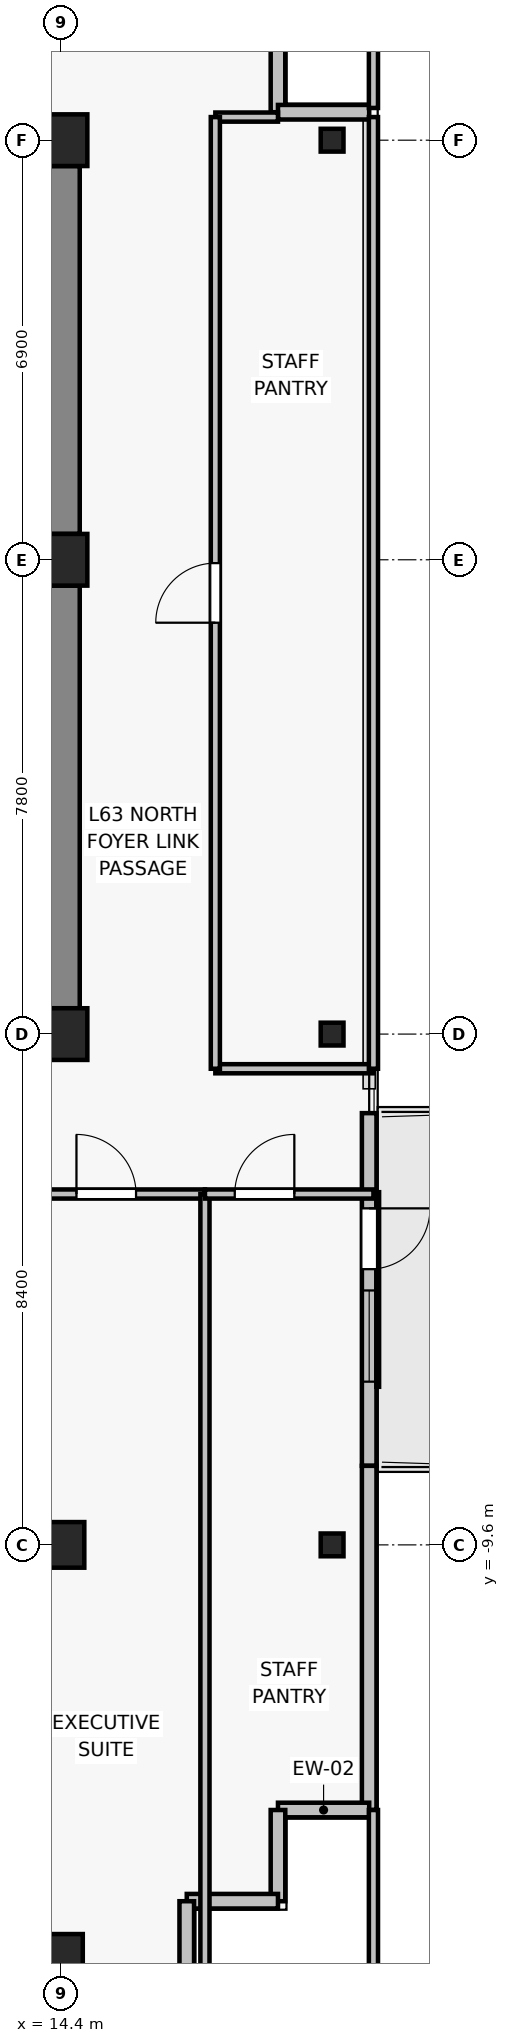
"""IFC4 building model, lengths in metres.
Left out: names, types, materials, properties, quantities, classifications, styles, units other than length and angle.
Written with IfcOpenShell. Run it as: python <this file> out.ifc"""

import sys

from ifc_helpers import new_model, si_unit, direction, frame, frame_2d, origin, origin_2d, place, context, subcontext, project, spatial, rectangle, i_section, extrude, source, transform, mapped, element, fill, save


model = new_model("IFC4")
c1 = context("Model", 3, precision=1e-05, world=origin(), true_north=direction((0.0, 1.0)))
c2 = subcontext(c1, "Body", "Model", "MODEL_VIEW")
j1 = project(units=[si_unit("LENGTHUNIT", "METRE"), si_unit("PLANEANGLEUNIT", "RADIAN")], contexts=[c1])
p1 = place(None, origin())
s1 = spatial("IfcSite", under=j1, at=p1, CompositionType="ELEMENT")
p2 = place(p1, origin())
s2 = spatial("IfcBuilding", under=s1, at=p2, CompositionType="ELEMENT")
p3 = place(p2, frame((0.0, 0.0, 225.4)))
s3 = spatial("IfcBuildingStorey", under=s2, at=p3, CompositionType="ELEMENT", Elevation=225.4)
for number, where, z_axis, x_axis in (
    (1, (14.4, -1.2, 0.0), (0.0, 0.0, 1.0), (1.0, 0.0, 0.0)),
    (2, (14.4, 6.6, 0.0), (0.0, 0.0, 1.0), (1.0, 0.0, 0.0)),
    (3, (14.4, 13.5, 0.0), (0.0, 0.0, 1.0), (1.0, 0.0, 0.0)),
):
    element("IfcColumn", number, at=place(p3, frame(where, z_axis=z_axis, x_axis=x_axis)), inside=s3, PredefinedType="COLUMN", context=c2, shape_type="SweptSolid", body=[
        extrude(rectangle(XDim=0.85, YDim=0.85, at=origin_2d()), origin(), (0.0, 0.0, 1.0), 3.3),
    ])
p4 = place(p3, frame((14.4, -9.6, 0.0), z_axis=(0.0, 0.0, 1.0), x_axis=(1.0, 0.0, 0.0)))
e4 = element("IfcColumn", 4, at=p4, inside=s3, PredefinedType="COLUMN", context=c2, shape_type="SweptSolid", body=[
    extrude(rectangle(XDim=0.75, YDim=0.75, at=origin_2d()), origin(), (0.0, 0.0, 1.0), 3.3),
])
p5 = place(p3, frame((14.4, -16.35, 0.0), z_axis=(0.0, 0.0, 1.0), x_axis=(1.0, 0.0, 0.0)))
e5 = element("IfcColumn", 5, at=p5, inside=s3, PredefinedType="COLUMN", context=c2, shape_type="SweptSolid", body=[
    extrude(rectangle(XDim=0.7, YDim=0.7, at=origin_2d()), origin(), (0.0, 0.0, 1.0), 3.3),
])
for number, where, z_axis, x_axis in (
    (6, (18.85, -9.6, 0.0), (0.0, 0.0, 1.0), (1.0, 0.0, 0.0)),
    (7, (18.85, -1.2, 0.0), (0.0, 0.0, 1.0), (1.0, 0.0, 0.0)),
    (8, (18.85, 13.5, 0.0), (0.0, 0.0, 1.0), (1.0, 0.0, 0.0)),
):
    element("IfcColumn", number, at=place(p3, frame(where, z_axis=z_axis, x_axis=x_axis)), inside=s3, PredefinedType="COLUMN", context=c2, shape_type="SweptSolid", body=[
        extrude(i_section(OverallWidth=0.375, OverallDepth=0.375, WebThickness=0.017, FlangeThickness=0.027, FilletRadius=0.015, at=origin_2d()), origin(), (0.0, 0.0, 1.0), 3.3),
    ])
p6 = place(p3, frame((14.4, -0.775, 0.0), z_axis=(0.0, 0.0, 1.0), x_axis=(0.0, 1.0, 0.0)))
e9 = element("IfcWall", 9, at=p6, inside=s3, PredefinedType="SHEAR", context=c2, shape_type="SweptSolid", body=[
    extrude(rectangle(XDim=6.95, YDim=0.6, at=frame_2d((3.475, 0.0))), origin(), (0.0, 0.0, 1.0), 3.075),
])
p7 = place(p3, frame((14.4, 7.025, 0.0), z_axis=(0.0, 0.0, 1.0), x_axis=(0.0, 1.0, 0.0)))
e10 = element("IfcWall", 10, at=p7, inside=s3, PredefinedType="SHEAR", context=c2, shape_type="SweptSolid", body=[
    extrude(rectangle(XDim=6.05, YDim=0.6, at=frame_2d((3.025, 0.0))), origin(), (0.0, 0.0, 1.0), 3.075),
])
p8 = place(p3, frame((19.46, -2.5, 0.0), z_axis=(0.0, 0.0, 1.0), x_axis=(0.0, -1.0, 0.0)))
e11 = element("IfcWall", 11, at=p8, inside=s3, PredefinedType="SOLIDWALL", context=c2, shape_type="SweptSolid", body=[
    extrude(rectangle(XDim=5.8, YDim=0.24, at=frame_2d((2.9, 0.0))), origin(), (0.0, 0.0, 1.0), 3.075),
])
p9 = place(p8, frame((1.566, 0.0, 0.0)))
e12 = element("IfcOpeningElement", 12, at=p9, cuts=e11, PredefinedType="OPENING", context=c2, shape_type="SweptSolid", body=[
    extrude(rectangle(XDim=1.0, YDim=2.2, at=frame_2d((0.5, 1.1))), frame((0.0, 0.13, 0.0), z_axis=(0.0, -1.0, 0.0), x_axis=(1.0, 0.0, 0.0)), (0.0, 0.0, 1.0), 0.26),
])
p10 = place(p8, frame((2.916, 0.0, 0.85)))
e13 = element("IfcOpeningElement", 13, at=p10, cuts=e11, PredefinedType="OPENING", context=c2, shape_type="SweptSolid", body=[
    extrude(rectangle(XDim=1.5, YDim=1.6, at=frame_2d((0.75, 0.8))), frame((0.0, 0.13, 0.0), z_axis=(0.0, -1.0, 0.0), x_axis=(1.0, 0.0, 0.0)), (0.0, 0.0, 1.0), 0.26),
])
for number, where, z_axis, x_axis in (
    (14, (17.96, 13.96, 0.0), (0.0, 0.0, 1.0), (0.0, 1.0, 0.0)),
    (15, (19.46, 13.96, 0.0), (0.0, 0.0, 1.0), (-1.0, 0.0, 0.0)),
):
    element("IfcWall", number, at=place(p3, frame(where, z_axis=z_axis, x_axis=x_axis)), inside=s3, PredefinedType="SOLIDWALL", context=c2, shape_type="SweptSolid", body=[
        extrude(rectangle(XDim=1.5, YDim=0.24, at=frame_2d((0.75, 0.0))), origin(), (0.0, 0.0, 1.0), 3.075),
    ])
p11 = place(p3, frame((19.46, -13.96, 0.0), z_axis=(0.0, 0.0, 1.0), x_axis=(0.0, 1.0, 0.0)))
e16 = element("IfcWall", 16, at=p11, inside=s3, PredefinedType="SOLIDWALL", context=c2, shape_type="SweptSolid", body=[
    extrude(rectangle(XDim=5.66, YDim=0.24, at=frame_2d((2.83, 0.0))), origin(), (0.0, 0.0, 1.0), 3.075),
])
for number, where, z_axis, x_axis in (
    (17, (17.96, -13.96, 0.0), (0.0, 0.0, 1.0), (1.0, 0.0, 0.0)),
    (18, (17.96, -15.46, 0.0), (0.0, 0.0, 1.0), (0.0, 1.0, 0.0)),
    (19, (16.46, -15.46, 0.0), (0.0, 0.0, 1.0), (1.0, 0.0, 0.0)),
    (20, (16.46, -16.96, 0.0), (0.0, 0.0, 1.0), (0.0, 1.0, 0.0)),
):
    element("IfcWall", number, at=place(p3, frame(where, z_axis=z_axis, x_axis=x_axis)), inside=s3, PredefinedType="SOLIDWALL", context=c2, shape_type="SweptSolid", body=[
        extrude(rectangle(XDim=1.5, YDim=0.24, at=frame_2d((0.75, 0.0))), origin(), (0.0, 0.0, 1.0), 3.075),
    ])
p12 = place(p3, frame((13.513, -3.83, 0.0), z_axis=(0.0, 0.0, 1.0), x_axis=(1.0, 0.0, 0.0)))
e21 = element("IfcWall", 21, at=p12, inside=s3, PredefinedType="PARTITIONING", context=c2, shape_type="SweptSolid", body=[
    extrude(rectangle(XDim=3.246, YDim=0.15, at=frame_2d((1.623, 0.0))), origin(), (0.0, 0.0, 1.0), 2.615),
])
p13 = place(p12, frame((1.133, 0.0, 0.0)))
e22 = element("IfcOpeningElement", 22, at=p13, cuts=e21, PredefinedType="OPENING", context=c2, shape_type="SweptSolid", body=[
    extrude(rectangle(XDim=0.98, YDim=2.15, at=frame_2d((0.49, 1.075))), frame((0.0, 0.085, 0.0), z_axis=(0.0, -1.0, 0.0), x_axis=(1.0, 0.0, 0.0)), (0.0, 0.0, 1.0), 0.17),
])
p14 = place(p3, frame((16.759, -3.83, 0.0), z_axis=(0.0, 0.0, 1.0), x_axis=(0.0, -1.0, 0.0)))
e23 = element("IfcWall", 23, at=p14, inside=s3, PredefinedType="PARTITIONING", context=c2, shape_type="SweptSolid", body=[
    extrude(rectangle(XDim=13.2, YDim=0.15, at=frame_2d((6.6, 0.0))), origin(), (0.0, 0.0, 1.0), 2.615),
])
p15 = place(p3, frame((16.759, -3.83, 0.0), z_axis=(0.0, 0.0, 1.0), x_axis=(1.0, 0.0, 0.0)))
e24 = element("IfcWall", 24, at=p15, inside=s3, PredefinedType="PARTITIONING", context=c2, shape_type="SweptSolid", body=[
    extrude(rectangle(XDim=2.771, YDim=0.15, at=frame_2d((1.385, 0.0))), origin(), (0.0, 0.0, 1.0), 2.765),
])
p16 = place(p15, frame((0.49, 0.0, 0.0)))
e25 = element("IfcOpeningElement", 25, at=p16, cuts=e24, PredefinedType="OPENING", context=c2, shape_type="SweptSolid", body=[
    extrude(rectangle(XDim=0.98, YDim=2.15, at=frame_2d((0.49, 1.075))), frame((0.0, 0.085, 0.0), z_axis=(0.0, -1.0, 0.0), x_axis=(1.0, 0.0, 0.0)), (0.0, 0.0, 1.0), 0.17),
])
p17 = place(p3, frame((19.53, -13.96, 0.0), z_axis=(0.0, 0.0, 1.0), x_axis=(0.0, -1.0, 0.0)))
e26 = element("IfcWall", 26, at=p17, inside=s3, PredefinedType="PARTITIONING", context=c2, shape_type="SweptSolid", body=[
    extrude(rectangle(XDim=3.07, YDim=0.15, at=frame_2d((1.535, 0.0))), origin(), (0.0, 0.0, 1.0), 3.075),
])
p18 = place(p3, frame((19.53, -1.77, 0.0), z_axis=(0.0, 0.0, 1.0), x_axis=(-1.0, 0.0, 0.0)))
e27 = element("IfcWall", 27, at=p18, inside=s3, PredefinedType="PARTITIONING", context=c2, shape_type="SweptSolid", body=[
    extrude(rectangle(XDim=2.6, YDim=0.15, at=frame_2d((1.3, 0.0))), origin(), (0.0, 0.0, 1.0), 2.765),
])
p19 = place(p3, frame((16.93, 13.88, 0.0), z_axis=(0.0, 0.0, 1.0), x_axis=(1.0, 0.0, 0.0)))
e28 = element("IfcWall", 28, at=p19, inside=s3, PredefinedType="PARTITIONING", context=c2, shape_type="SweptSolid", body=[
    extrude(rectangle(XDim=1.03, YDim=0.15, at=frame_2d((0.515, 0.0))), origin(), (0.0, 0.0, 1.0), 3.075),
])
p20 = place(p3, frame((16.93, -1.77, 0.0), z_axis=(0.0, 0.0, 1.0), x_axis=(0.0, 1.0, 0.0)))
e29 = element("IfcWall", 29, at=p20, inside=s3, PredefinedType="PARTITIONING", context=c2, shape_type="SweptSolid", body=[
    extrude(rectangle(XDim=15.65, YDim=0.15, at=frame_2d((7.825, 0.0))), origin(), (0.0, 0.0, 1.0), 2.615),
])
p21 = place(p20, frame((7.335, 0.0, 0.0)))
e30 = element("IfcOpeningElement", 30, at=p21, cuts=e29, PredefinedType="OPENING", context=c2, shape_type="SweptSolid", body=[
    extrude(rectangle(XDim=0.98, YDim=2.15, at=frame_2d((0.49, 1.075))), frame((0.0, 0.085, 0.0), z_axis=(0.0, -1.0, 0.0), x_axis=(1.0, 0.0, 0.0)), (0.0, 0.0, 1.0), 0.17),
])
p22 = place(p3, frame((19.53, 13.88, 0.0), z_axis=(0.0, 0.0, 1.0), x_axis=(0.0, -1.0, 0.0)))
e31 = element("IfcWall", 31, at=p22, inside=s3, PredefinedType="PARTITIONING", context=c2, shape_type="SweptSolid", body=[
    extrude(rectangle(XDim=15.65, YDim=0.15, at=frame_2d((7.825, 0.0))), origin(), (0.0, 0.0, 1.0), 3.075),
])
p23 = place(p3, frame((19.53, 17.03, 0.0), z_axis=(0.0, 0.0, 1.0), x_axis=(0.0, -1.0, 0.0)))
e32 = element("IfcWall", 32, at=p23, inside=s3, PredefinedType="PARTITIONING", context=c2, shape_type="SweptSolid", body=[
    extrude(rectangle(XDim=3.0, YDim=0.15, at=frame_2d((1.5, 0.0))), origin(), (0.0, 0.0, 1.0), 3.075),
])
m1 = source(origin(), c2, "Body", "SweptSolid", [
    extrude(rectangle(XDim=1.0, YDim=2.2, at=frame_2d((0.5, 1.1))), frame((0.0, 0.025, 0.0), z_axis=(0.0, -1.0, 0.0), x_axis=(1.0, 0.0, 0.0)), (0.0, 0.0, 1.0), 0.05),
])
p24 = place(p9, origin())
e33 = element("IfcDoor", 33, at=p24, inside=s3, OperationType="SINGLE_SWING_LEFT", PredefinedType="DOOR", context=c2, shape_type="MappedRepresentation", body=[
    mapped(m1, transform((0.0, 0.0, 0.0), x_axis=(1.0, 0.0, 0.0), y_axis=(0.0, 1.0, 0.0), z_axis=(0.0, 0.0, 1.0), scale=1.0)),
])
fill(e12, e33)
m2 = source(origin(), c2, "Body", "SweptSolid", [
    extrude(rectangle(XDim=1.5, YDim=1.6, at=frame_2d((0.75, 0.8))), frame((0.0, 0.03, 0.0), z_axis=(0.0, -1.0, 0.0), x_axis=(1.0, 0.0, 0.0)), (0.0, 0.0, 1.0), 0.06),
])
p25 = place(p10, origin())
e34 = element("IfcWindow", 34, at=p25, inside=s3, PartitioningType="SINGLE_PANEL", PredefinedType="WINDOW", context=c2, shape_type="MappedRepresentation", body=[
    mapped(m2, transform((0.0, 0.0, 0.0), x_axis=(1.0, 0.0, 0.0), y_axis=(0.0, 1.0, 0.0), z_axis=(0.0, 0.0, 1.0), scale=1.0)),
])
fill(e13, e34)
m3 = source(origin(), c2, "Body", "SweptSolid", [
    extrude(rectangle(XDim=0.98, YDim=2.15, at=frame_2d((0.49, 1.075))), frame((0.0, 0.025, 0.0), z_axis=(0.0, -1.0, 0.0), x_axis=(1.0, 0.0, 0.0)), (0.0, 0.0, 1.0), 0.05),
])
p26 = place(p13, origin())
e35 = element("IfcDoor", 35, at=p26, inside=s3, OperationType="SINGLE_SWING_LEFT", PredefinedType="DOOR", context=c2, shape_type="MappedRepresentation", body=[
    mapped(m3, transform((0.0, 0.0, 0.0), x_axis=(1.0, 0.0, 0.0), y_axis=(0.0, 1.0, 0.0), z_axis=(0.0, 0.0, 1.0), scale=1.0)),
])
fill(e22, e35)
p27 = place(p16, origin())
e36 = element("IfcDoor", 36, at=p27, inside=s3, OperationType="SINGLE_SWING_RIGHT", PredefinedType="DOOR", context=c2, shape_type="MappedRepresentation", body=[
    mapped(m3, transform((0.0, 0.0, 0.0), x_axis=(1.0, 0.0, 0.0), y_axis=(0.0, 1.0, 0.0), z_axis=(0.0, 0.0, 1.0), scale=1.0)),
])
fill(e25, e36)
p28 = place(p21, origin())
e37 = element("IfcDoor", 37, at=p28, inside=s3, OperationType="SINGLE_SWING_LEFT", PredefinedType="DOOR", context=c2, shape_type="MappedRepresentation", body=[
    mapped(m3, transform((0.0, 0.0, 0.0), x_axis=(1.0, 0.0, 0.0), y_axis=(0.0, 1.0, 0.0), z_axis=(0.0, 0.0, 1.0), scale=1.0)),
])
fill(e30, e37)
save(model, sys.argv[1])
